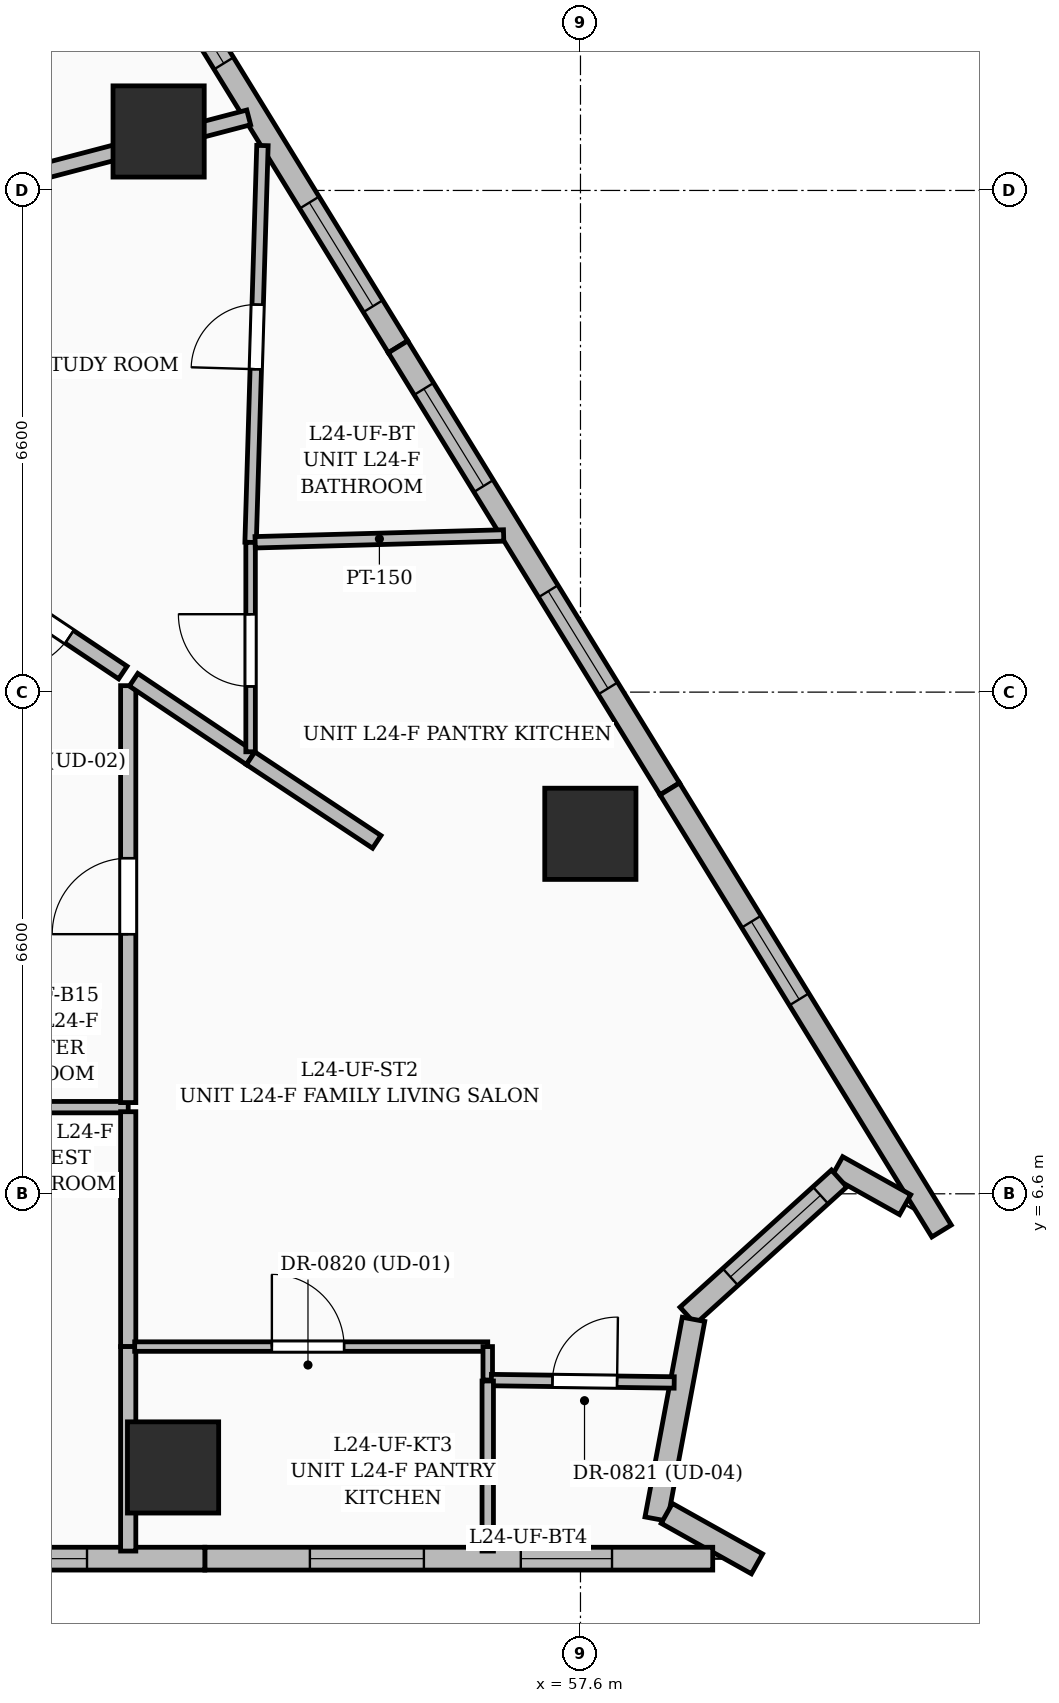
"""IFC4 building model, lengths in metres.
Left out: names, types, materials, properties, quantities, classifications, styles, units other than length and angle.
Written with IfcOpenShell. Run it as: python <this file> out.ifc"""

import sys

from ifc_helpers import new_model, si_unit, direction, frame, frame_2d, origin, origin_2d, place, context, subcontext, project, spatial, rectangle, extrude, element, fill, save


model = new_model("IFC4")
c1 = context("Model", 3, precision=1e-05, world=origin(), true_north=direction((0.0, 1.0)))
c2 = subcontext(c1, "Body", "Model", "MODEL_VIEW")
j1 = project(units=[si_unit("LENGTHUNIT", "METRE"), si_unit("PLANEANGLEUNIT", "RADIAN")], contexts=[c1])
p1 = place(None, origin())
s1 = spatial("IfcSite", under=j1, at=p1, CompositionType="ELEMENT")
p2 = place(p1, origin())
s2 = spatial("IfcBuilding", under=s1, at=p2, CompositionType="ELEMENT")
p3 = place(p2, frame((0.0, 0.0, 96.6)))
s3 = spatial("IfcBuildingStorey", under=s2, at=p3, CompositionType="ELEMENT", Elevation=96.6)
for number, where, z_axis, x_axis in (
    (1, (52.24, 3.0, 0.0), (0.0, 0.0, 1.0), (1.0, 0.0, 0.0)),
    (2, (57.73, 11.336, 0.0), (0.0, 0.0, 1.0), (1.0, 0.0, 0.0)),
    (3, (52.05, 20.576, 0.0), (0.0, 0.0, 1.0), (1.0, 0.0, 0.0)),
):
    element("IfcColumn", number, at=place(p3, frame(where, z_axis=z_axis, x_axis=x_axis)), inside=s3, PredefinedType="COLUMN", context=c2, shape_type="SweptSolid", body=[
        extrude(rectangle(XDim=1.2, YDim=1.2, at=origin_2d()), origin(), (0.0, 0.0, 1.0), 3.6),
    ])
p4 = place(p3, frame((51.624, 23.559, 0.0), z_axis=(0.0, 0.0, 1.0), x_axis=(0.52370032897, -0.851902556303, 0.0)))
e4 = element("IfcWall", 4, at=p4, inside=s3, PredefinedType="SOLIDWALL", context=c2, shape_type="SweptSolid", body=[
    extrude(rectangle(XDim=6.827, YDim=0.3, at=frame_2d((3.414, 0.0))), origin(), (0.0, 0.0, 1.0), 3.3),
])
p5 = place(p4, frame((4.6, 0.0, 0.55)))
e5 = element("IfcOpeningElement", 5, at=p5, cuts=e4, PredefinedType="OPENING", context=c2, shape_type="SweptSolid", body=[
    extrude(rectangle(XDim=1.6, YDim=2.2, at=frame_2d((0.8, 1.1))), frame((0.0, 0.16, 0.0), z_axis=(0.0, -1.0, 0.0), x_axis=(1.0, 0.0, 0.0)), (0.0, 0.0, 1.0), 0.32),
])
p6 = place(p4, frame((0.85, 0.0, 0.55)))
e6 = element("IfcOpeningElement", 6, at=p6, cuts=e4, PredefinedType="OPENING", context=c2, shape_type="SweptSolid", body=[
    extrude(rectangle(XDim=1.6, YDim=2.2, at=frame_2d((0.8, 1.1))), frame((0.0, 0.16, 0.0), z_axis=(0.0, -1.0, 0.0), x_axis=(1.0, 0.0, 0.0)), (0.0, 0.0, 1.0), 0.32),
])
p7 = place(p3, frame((55.199, 17.743, 0.0), z_axis=(0.0, 0.0, 1.0), x_axis=(0.52370032897, -0.851902556303, 0.0)))
e7 = element("IfcWall", 7, at=p7, inside=s3, PredefinedType="SOLIDWALL", context=c2, shape_type="SweptSolid", body=[
    extrude(rectangle(XDim=6.827, YDim=0.3, at=frame_2d((3.414, 0.0))), origin(), (0.0, 0.0, 1.0), 3.3),
])
p8 = place(p7, frame((0.65, 0.0, 0.6)))
e8 = element("IfcOpeningElement", 8, at=p8, cuts=e7, PredefinedType="OPENING", context=c2, shape_type="SweptSolid", body=[
    extrude(rectangle(XDim=1.5, YDim=2.1, at=frame_2d((0.75, 1.05))), frame((0.0, 0.16, 0.0), z_axis=(0.0, -1.0, 0.0), x_axis=(1.0, 0.0, 0.0)), (0.0, 0.0, 1.0), 0.32),
])
p9 = place(p7, frame((3.775, 0.0, 0.6)))
e9 = element("IfcOpeningElement", 9, at=p9, cuts=e7, PredefinedType="OPENING", context=c2, shape_type="SweptSolid", body=[
    extrude(rectangle(XDim=1.5, YDim=2.1, at=frame_2d((0.75, 1.05))), frame((0.0, 0.16, 0.0), z_axis=(0.0, -1.0, 0.0), x_axis=(1.0, 0.0, 0.0)), (0.0, 0.0, 1.0), 0.32),
])
p10 = place(p3, frame((58.775, 11.927, 0.0), z_axis=(0.0, 0.0, 1.0), x_axis=(0.52370032897, -0.851902556303, 0.0)))
e10 = element("IfcWall", 10, at=p10, inside=s3, PredefinedType="SOLIDWALL", context=c2, shape_type="SweptSolid", body=[
    extrude(rectangle(XDim=6.827, YDim=0.3, at=frame_2d((3.414, 0.0))), origin(), (0.0, 0.0, 1.0), 3.3),
])
p11 = place(p10, frame((2.05, 0.0, 0.8)))
e11 = element("IfcOpeningElement", 11, at=p11, cuts=e10, PredefinedType="OPENING", context=c2, shape_type="SweptSolid", body=[
    extrude(rectangle(XDim=1.2, YDim=1.8, at=frame_2d((0.6, 0.9))), frame((0.0, 0.16, 0.0), z_axis=(0.0, -1.0, 0.0), x_axis=(1.0, 0.0, 0.0)), (0.0, 0.0, 1.0), 0.32),
])
p12 = place(p3, frame((61.871, 6.457, 0.0), z_axis=(0.0, 0.0, 1.0), x_axis=(-0.872635981388, 0.488371215355, 0.0)))
e12 = element("IfcWall", 12, at=p12, inside=s3, PredefinedType="SOLIDWALL", context=c2, shape_type="SweptSolid", body=[
    extrude(rectangle(XDim=1.025, YDim=0.3, at=frame_2d((0.512, 0.0))), origin(), (0.0, 0.0, 1.0), 3.3),
])
p13 = place(p3, frame((61.003, 6.802, 0.0), z_axis=(0.0, 0.0, 1.0), x_axis=(-0.741163448221, -0.671324618215, 0.0)))
e13 = element("IfcWall", 13, at=p13, inside=s3, PredefinedType="SOLIDWALL", context=c2, shape_type="SweptSolid", body=[
    extrude(rectangle(XDim=2.688, YDim=0.3, at=frame_2d((1.344, 0.0))), origin(), (0.0, 0.0, 1.0), 3.3),
])
p14 = place(p13, frame((0.33, 0.0, 0.55)))
e14 = element("IfcOpeningElement", 14, at=p14, cuts=e13, PredefinedType="OPENING", context=c2, shape_type="SweptSolid", body=[
    extrude(rectangle(XDim=1.6, YDim=2.2, at=frame_2d((0.8, 1.1))), frame((0.0, 0.16, 0.0), z_axis=(0.0, -1.0, 0.0), x_axis=(1.0, 0.0, 0.0)), (0.0, 0.0, 1.0), 0.32),
])
p15 = place(p3, frame((59.087, 4.948, 0.0), z_axis=(0.0, 0.0, 1.0), x_axis=(-0.183786629236, -0.982966161632, 0.0)))
e15 = element("IfcWall", 15, at=p15, inside=s3, PredefinedType="SOLIDWALL", context=c2, shape_type="SweptSolid", body=[
    extrude(rectangle(XDim=2.673, YDim=0.3, at=frame_2d((1.336, 0.0))), origin(), (0.0, 0.0, 1.0), 3.3),
])
p16 = place(p3, frame((58.735, 2.396, 0.0), z_axis=(0.0, 0.0, 1.0), x_axis=(0.872747775204, -0.488171405221, 0.0)))
e16 = element("IfcWall", 16, at=p16, inside=s3, PredefinedType="SOLIDWALL", context=c2, shape_type="SweptSolid", body=[
    extrude(rectangle(XDim=1.36, YDim=0.3, at=frame_2d((0.68, 0.0))), origin(), (0.0, 0.0, 1.0), 3.3),
])
p17 = place(p3, frame((59.34, 1.8, 0.0), z_axis=(0.0, 0.0, 1.0), x_axis=(-1.0, 0.0, 0.0)))
e17 = element("IfcWall", 17, at=p17, inside=s3, PredefinedType="SOLIDWALL", context=c2, shape_type="SweptSolid", body=[
    extrude(rectangle(XDim=6.682, YDim=0.3, at=frame_2d((3.341, 0.0))), origin(), (0.0, 0.0, 1.0), 3.3),
])
p18 = place(p17, frame((3.8, 0.0, 0.6)))
e18 = element("IfcOpeningElement", 18, at=p18, cuts=e17, PredefinedType="OPENING", context=c2, shape_type="SweptSolid", body=[
    extrude(rectangle(XDim=1.5, YDim=2.1, at=frame_2d((0.75, 1.05))), frame((0.0, 0.16, 0.0), z_axis=(0.0, -1.0, 0.0), x_axis=(1.0, 0.0, 0.0)), (0.0, 0.0, 1.0), 0.32),
])
p19 = place(p17, frame((1.325, 0.0, 0.8)))
e19 = element("IfcOpeningElement", 19, at=p19, cuts=e17, PredefinedType="OPENING", context=c2, shape_type="SweptSolid", body=[
    extrude(rectangle(XDim=1.2, YDim=1.8, at=frame_2d((0.6, 0.9))), frame((0.0, 0.16, 0.0), z_axis=(0.0, -1.0, 0.0), x_axis=(1.0, 0.0, 0.0)), (0.0, 0.0, 1.0), 0.32),
])
p20 = place(p3, frame((52.658, 1.8, 0.0), z_axis=(0.0, 0.0, 1.0), x_axis=(-1.0, 0.0, 0.0)))
e20 = element("IfcWall", 20, at=p20, inside=s3, PredefinedType="SOLIDWALL", context=c2, shape_type="SweptSolid", body=[
    extrude(rectangle(XDim=7.282, YDim=0.3, at=frame_2d((3.641, 0.0))), origin(), (0.0, 0.0, 1.0), 3.3),
])
p21 = place(p20, frame((1.55, 0.0, 0.8)))
e21 = element("IfcOpeningElement", 21, at=p21, cuts=e20, PredefinedType="OPENING", context=c2, shape_type="SweptSolid", body=[
    extrude(rectangle(XDim=1.2, YDim=1.8, at=frame_2d((0.6, 0.9))), frame((0.0, 0.16, 0.0), z_axis=(0.0, -1.0, 0.0), x_axis=(1.0, 0.0, 0.0)), (0.0, 0.0, 1.0), 0.32),
])
p22 = place(p20, frame((4.425, 0.0, 0.8)))
e22 = element("IfcOpeningElement", 22, at=p22, cuts=e20, PredefinedType="OPENING", context=c2, shape_type="SweptSolid", body=[
    extrude(rectangle(XDim=1.2, YDim=1.8, at=frame_2d((0.6, 0.9))), frame((0.0, 0.16, 0.0), z_axis=(0.0, -1.0, 0.0), x_axis=(1.0, 0.0, 0.0)), (0.0, 0.0, 1.0), 0.32),
])
p23 = place(p3, frame((51.65, 7.74, 0.0), z_axis=(0.0, 0.0, 1.0), x_axis=(-1.0, 0.0, 0.0)))
e23 = element("IfcWall", 23, at=p23, inside=s3, PredefinedType="PARTITIONING", context=c2, shape_type="SweptSolid", body=[
    extrude(rectangle(XDim=2.355, YDim=0.15, at=frame_2d((1.177, 0.0))), origin(), (0.0, 0.0, 1.0), 3.3),
])
p24 = place(p3, frame((51.65, 4.59, 0.0), z_axis=(0.0, 0.0, 1.0), x_axis=(0.0, 1.0, 0.0)))
e24 = element("IfcWall", 24, at=p24, inside=s3, PredefinedType="PARTITIONING", context=c2, shape_type="SweptSolid", body=[
    extrude(rectangle(XDim=3.09, YDim=0.2, at=frame_2d((1.545, 0.0))), origin(), (0.0, 0.0, 1.0), 2.81),
])
p25 = place(p3, frame((51.65, 1.9, 0.0), z_axis=(0.0, 0.0, 1.0), x_axis=(0.0, 1.0, 0.0)))
e25 = element("IfcWall", 25, at=p25, inside=s3, PredefinedType="PARTITIONING", context=c2, shape_type="SweptSolid", body=[
    extrude(rectangle(XDim=2.69, YDim=0.2, at=frame_2d((1.345, 0.0))), origin(), (0.0, 0.0, 1.0), 2.295),
])
p26 = place(p3, frame((51.65, 7.8, 0.0), z_axis=(0.0, 0.0, 1.0), x_axis=(0.0, 1.0, 0.0)))
e26 = element("IfcWall", 26, at=p26, inside=s3, PredefinedType="PARTITIONING", context=c2, shape_type="SweptSolid", body=[
    extrude(rectangle(XDim=5.485, YDim=0.2, at=frame_2d((2.742, 0.0))), origin(), (0.0, 0.0, 1.0), 2.295),
])
p27 = place(p26, frame((2.216, 0.0, 0.0)))
e27 = element("IfcOpeningElement", 27, at=p27, cuts=e26, PredefinedType="OPENING", context=c2, shape_type="SweptSolid", body=[
    extrude(rectangle(XDim=1.0, YDim=2.2, at=frame_2d((0.5, 1.1))), frame((0.0, 0.11, 0.0), z_axis=(0.0, -1.0, 0.0), x_axis=(1.0, 0.0, 0.0)), (0.0, 0.0, 1.0), 0.22),
])
p28 = place(p3, frame((51.579, 13.457, 0.0), z_axis=(0.0, 0.0, 1.0), x_axis=(-0.831522214089, 0.555491500814, 0.0)))
e28 = element("IfcWall", 28, at=p28, inside=s3, PredefinedType="PARTITIONING", context=c2, shape_type="SweptSolid", body=[
    extrude(rectangle(XDim=2.705, YDim=0.2, at=frame_2d((1.352, 0.0))), origin(), (0.0, 0.0, 1.0), 2.81),
])
p29 = place(p28, frame((0.846, 0.0, 0.0)))
e29 = element("IfcOpeningElement", 29, at=p29, cuts=e28, PredefinedType="OPENING", context=c2, shape_type="SweptSolid", body=[
    extrude(rectangle(XDim=1.0, YDim=2.2, at=frame_2d((0.5, 1.1))), frame((0.0, 0.11, 0.0), z_axis=(0.0, -1.0, 0.0), x_axis=(1.0, 0.0, 0.0)), (0.0, 0.0, 1.0), 0.22),
])
p30 = place(p3, frame((51.735, 4.59, 0.0), z_axis=(0.0, 0.0, 1.0), x_axis=(1.0, 0.0, 0.0)))
e30 = element("IfcWall", 30, at=p30, inside=s3, PredefinedType="PARTITIONING", context=c2, shape_type="SweptSolid", body=[
    extrude(rectangle(XDim=4.645, YDim=0.125, at=frame_2d((2.322, 0.0))), origin(), (0.0, 0.0, 1.0), 2.32),
])
p31 = place(p30, frame((1.805, 0.0, 0.0)))
e31 = element("IfcOpeningElement", 31, at=p31, cuts=e30, PredefinedType="OPENING", context=c2, shape_type="SweptSolid", body=[
    extrude(rectangle(XDim=0.95, YDim=2.2, at=frame_2d((0.475, 1.1))), frame((0.0, 0.072, 0.0), z_axis=(0.0, -1.0, 0.0), x_axis=(1.0, 0.0, 0.0)), (0.0, 0.0, 1.0), 0.145),
])
p32 = place(p3, frame((56.38, 4.59, 0.0), z_axis=(0.0, 0.0, 1.0), x_axis=(0.0, -1.0, 0.0)))
e32 = element("IfcWall", 32, at=p32, inside=s3, PredefinedType="PARTITIONING", context=c2, shape_type="SweptSolid", body=[
    extrude(rectangle(XDim=0.44, YDim=0.125, at=frame_2d((0.22, 0.0))), origin(), (0.0, 0.0, 1.0), 3.3),
])
p33 = place(p3, frame((56.427, 4.149, 0.0), z_axis=(0.0, 0.0, 1.0), x_axis=(0.999914304773, -0.013091337188, 0.0)))
e33 = element("IfcWall", 33, at=p33, inside=s3, PredefinedType="PARTITIONING", context=c2, shape_type="SweptSolid", body=[
    extrude(rectangle(XDim=2.406, YDim=0.15, at=frame_2d((1.203, 0.0))), origin(), (0.0, 0.0, 1.0), 3.3),
])
p34 = place(p33, frame((0.804, 0.0, 0.0)))
e34 = element("IfcOpeningElement", 34, at=p34, cuts=e33, PredefinedType="OPENING", context=c2, shape_type="SweptSolid", body=[
    extrude(rectangle(XDim=0.85, YDim=2.1, at=frame_2d((0.425, 1.05))), frame((0.0, 0.085, 0.0), z_axis=(0.0, -1.0, 0.0), x_axis=(1.0, 0.0, 0.0)), (0.0, 0.0, 1.0), 0.17),
])
p35 = place(p3, frame((53.26, 12.33, 0.0), z_axis=(0.0, 0.0, 1.0), x_axis=(-0.830486641952, 0.557038542239, 0.0)))
e35 = element("IfcWall", 35, at=p35, inside=s3, PredefinedType="PARTITIONING", context=c2, shape_type="SweptSolid", body=[
    extrude(rectangle(XDim=1.854, YDim=0.2, at=frame_2d((0.927, 0.0))), origin(), (0.0, 0.0, 1.0), 2.81),
])
p36 = place(p3, frame((54.92, 11.23, 0.0), z_axis=(0.0, 0.0, 1.0), x_axis=(-0.833556136646, 0.552434762719, 0.0)))
e36 = element("IfcWall", 36, at=p36, inside=s3, PredefinedType="PARTITIONING", context=c2, shape_type="SweptSolid", body=[
    extrude(rectangle(XDim=1.991, YDim=0.2, at=frame_2d((0.996, 0.0))), origin(), (0.0, 0.0, 1.0), 2.295),
])
p37 = place(p3, frame((56.38, 1.9, 0.0), z_axis=(0.0, 0.0, 1.0), x_axis=(0.0, 1.0, 0.0)))
e37 = element("IfcWall", 37, at=p37, inside=s3, PredefinedType="PARTITIONING", context=c2, shape_type="SweptSolid", body=[
    extrude(rectangle(XDim=2.238, YDim=0.15, at=frame_2d((1.119, 0.0))), origin(), (0.0, 0.0, 1.0), 3.3),
])
p38 = place(p3, frame((53.26, 15.17, 0.0), z_axis=(0.0, 0.0, 1.0), x_axis=(0.029866031463, 0.999553910584, 0.0)))
e38 = element("IfcWall", 38, at=p38, inside=s3, PredefinedType="PARTITIONING", context=c2, shape_type="SweptSolid", body=[
    extrude(rectangle(XDim=5.224, YDim=0.15, at=frame_2d((2.612, 0.0))), origin(), (0.0, 0.0, 1.0), 2.32),
])
p39 = place(p38, frame((2.279, 0.0, 0.0)))
e39 = element("IfcOpeningElement", 39, at=p39, cuts=e38, PredefinedType="OPENING", context=c2, shape_type="SweptSolid", body=[
    extrude(rectangle(XDim=0.85, YDim=2.1, at=frame_2d((0.425, 1.05))), frame((0.0, 0.085, 0.0), z_axis=(0.0, -1.0, 0.0), x_axis=(1.0, 0.0, 0.0)), (0.0, 0.0, 1.0), 0.17),
])
p40 = place(p3, frame((53.26, 12.415, 0.0), z_axis=(0.0, 0.0, 1.0), x_axis=(0.0, 1.0, 0.0)))
e40 = element("IfcWall", 40, at=p40, inside=s3, PredefinedType="PARTITIONING", context=c2, shape_type="SweptSolid", body=[
    extrude(rectangle(XDim=2.755, YDim=0.125, at=frame_2d((1.377, 0.0))), origin(), (0.0, 0.0, 1.0), 3.3),
])
p41 = place(p40, frame((0.86, 0.0, 0.0)))
e41 = element("IfcOpeningElement", 41, at=p41, cuts=e40, PredefinedType="OPENING", context=c2, shape_type="SweptSolid", body=[
    extrude(rectangle(XDim=0.95, YDim=2.2, at=frame_2d((0.475, 1.1))), frame((0.0, 0.072, 0.0), z_axis=(0.0, -1.0, 0.0), x_axis=(1.0, 0.0, 0.0)), (0.0, 0.0, 1.0), 0.145),
])
p42 = place(p3, frame((53.235, 20.761, 0.0), z_axis=(0.0, 0.0, 1.0), x_axis=(-0.967298670581, -0.253640063657, 0.0)))
e42 = element("IfcWall", 42, at=p42, inside=s3, PredefinedType="PARTITIONING", context=c2, shape_type="SweptSolid", body=[
    extrude(rectangle(XDim=11.241, YDim=0.2, at=frame_2d((5.62, 0.0))), origin(), (0.0, 0.0, 1.0), 2.259),
])
p43 = place(p3, frame((53.32, 15.171, 0.0), z_axis=(0.0, 0.0, 1.0), x_axis=(0.999624598181, 0.02739822461, 0.0)))
e43 = element("IfcWall", 43, at=p43, inside=s3, PredefinedType="PARTITIONING", context=c2, shape_type="SweptSolid", body=[
    extrude(rectangle(XDim=3.27, YDim=0.15, at=frame_2d((1.635, 0.0))), origin(), (0.0, 0.0, 1.0), 2.32),
])
p44 = place(p5, origin())
e44 = element("IfcWindow", 44, at=p44, inside=s3, PartitioningType="SINGLE_PANEL", PredefinedType="WINDOW", context=c2, shape_type="SweptSolid", body=[
    extrude(rectangle(XDim=1.6, YDim=2.2, at=frame_2d((0.8, 1.1))), frame((0.0, 0.03, 0.0), z_axis=(0.0, -1.0, 0.0), x_axis=(1.0, 0.0, 0.0)), (0.0, 0.0, 1.0), 0.06),
])
fill(e5, e44)
p45 = place(p6, origin())
e45 = element("IfcWindow", 45, at=p45, inside=s3, PartitioningType="SINGLE_PANEL", PredefinedType="WINDOW", context=c2, shape_type="SweptSolid", body=[
    extrude(rectangle(XDim=1.6, YDim=2.2, at=frame_2d((0.8, 1.1))), frame((0.0, 0.03, 0.0), z_axis=(0.0, -1.0, 0.0), x_axis=(1.0, 0.0, 0.0)), (0.0, 0.0, 1.0), 0.06),
])
fill(e6, e45)
p46 = place(p8, origin())
e46 = element("IfcWindow", 46, at=p46, inside=s3, PartitioningType="SINGLE_PANEL", PredefinedType="WINDOW", context=c2, shape_type="SweptSolid", body=[
    extrude(rectangle(XDim=1.5, YDim=2.1, at=frame_2d((0.75, 1.05))), frame((0.0, 0.03, 0.0), z_axis=(0.0, -1.0, 0.0), x_axis=(1.0, 0.0, 0.0)), (0.0, 0.0, 1.0), 0.06),
])
fill(e8, e46)
p47 = place(p9, origin())
e47 = element("IfcWindow", 47, at=p47, inside=s3, PartitioningType="SINGLE_PANEL", PredefinedType="WINDOW", context=c2, shape_type="SweptSolid", body=[
    extrude(rectangle(XDim=1.5, YDim=2.1, at=frame_2d((0.75, 1.05))), frame((0.0, 0.03, 0.0), z_axis=(0.0, -1.0, 0.0), x_axis=(1.0, 0.0, 0.0)), (0.0, 0.0, 1.0), 0.06),
])
fill(e9, e47)
p48 = place(p11, origin())
e48 = element("IfcWindow", 48, at=p48, inside=s3, PartitioningType="SINGLE_PANEL", PredefinedType="WINDOW", context=c2, shape_type="SweptSolid", body=[
    extrude(rectangle(XDim=1.2, YDim=1.8, at=frame_2d((0.6, 0.9))), frame((0.0, 0.03, 0.0), z_axis=(0.0, -1.0, 0.0), x_axis=(1.0, 0.0, 0.0)), (0.0, 0.0, 1.0), 0.06),
])
fill(e11, e48)
p49 = place(p14, origin())
e49 = element("IfcWindow", 49, at=p49, inside=s3, PartitioningType="SINGLE_PANEL", PredefinedType="WINDOW", context=c2, shape_type="SweptSolid", body=[
    extrude(rectangle(XDim=1.6, YDim=2.2, at=frame_2d((0.8, 1.1))), frame((0.0, 0.03, 0.0), z_axis=(0.0, -1.0, 0.0), x_axis=(1.0, 0.0, 0.0)), (0.0, 0.0, 1.0), 0.06),
])
fill(e14, e49)
p50 = place(p18, origin())
e50 = element("IfcWindow", 50, at=p50, inside=s3, PartitioningType="SINGLE_PANEL", PredefinedType="WINDOW", context=c2, shape_type="SweptSolid", body=[
    extrude(rectangle(XDim=1.5, YDim=2.1, at=frame_2d((0.75, 1.05))), frame((0.0, 0.03, 0.0), z_axis=(0.0, -1.0, 0.0), x_axis=(1.0, 0.0, 0.0)), (0.0, 0.0, 1.0), 0.06),
])
fill(e18, e50)
p51 = place(p19, origin())
e51 = element("IfcWindow", 51, at=p51, inside=s3, PartitioningType="SINGLE_PANEL", PredefinedType="WINDOW", context=c2, shape_type="SweptSolid", body=[
    extrude(rectangle(XDim=1.2, YDim=1.8, at=frame_2d((0.6, 0.9))), frame((0.0, 0.03, 0.0), z_axis=(0.0, -1.0, 0.0), x_axis=(1.0, 0.0, 0.0)), (0.0, 0.0, 1.0), 0.06),
])
fill(e19, e51)
p52 = place(p21, origin())
e52 = element("IfcWindow", 52, at=p52, inside=s3, PartitioningType="SINGLE_PANEL", PredefinedType="WINDOW", context=c2, shape_type="SweptSolid", body=[
    extrude(rectangle(XDim=1.2, YDim=1.8, at=frame_2d((0.6, 0.9))), frame((0.0, 0.03, 0.0), z_axis=(0.0, -1.0, 0.0), x_axis=(1.0, 0.0, 0.0)), (0.0, 0.0, 1.0), 0.06),
])
fill(e21, e52)
p53 = place(p31, origin())
e53 = element("IfcDoor", 53, at=p53, inside=s3, OperationType="SINGLE_SWING_LEFT", PredefinedType="DOOR", context=c2, shape_type="SweptSolid", body=[
    extrude(rectangle(XDim=0.95, YDim=2.2, at=frame_2d((0.475, 1.1))), frame((0.0, 0.025, 0.0), z_axis=(0.0, -1.0, 0.0), x_axis=(1.0, 0.0, 0.0)), (0.0, 0.0, 1.0), 0.05),
])
fill(e31, e53)
p54 = place(p34, origin())
e54 = element("IfcDoor", 54, at=p54, inside=s3, OperationType="SINGLE_SWING_RIGHT", PredefinedType="DOOR", context=c2, shape_type="SweptSolid", body=[
    extrude(rectangle(XDim=0.85, YDim=2.1, at=frame_2d((0.425, 1.05))), frame((0.0, 0.025, 0.0), z_axis=(0.0, -1.0, 0.0), x_axis=(1.0, 0.0, 0.0)), (0.0, 0.0, 1.0), 0.05),
])
fill(e34, e54)
p55 = place(p41, origin())
e55 = element("IfcDoor", 55, at=p55, inside=s3, OperationType="SINGLE_SWING_RIGHT", PredefinedType="DOOR", context=c2, shape_type="SweptSolid", body=[
    extrude(rectangle(XDim=0.95, YDim=2.2, at=frame_2d((0.475, 1.1))), frame((0.0, 0.025, 0.0), z_axis=(0.0, -1.0, 0.0), x_axis=(1.0, 0.0, 0.0)), (0.0, 0.0, 1.0), 0.05),
])
fill(e41, e55)
p56 = place(p39, origin())
e56 = element("IfcDoor", 56, at=p56, inside=s3, OperationType="SINGLE_SWING_LEFT", PredefinedType="DOOR", context=c2, shape_type="SweptSolid", body=[
    extrude(rectangle(XDim=0.85, YDim=2.1, at=frame_2d((0.425, 1.05))), frame((0.0, 0.025, 0.0), z_axis=(0.0, -1.0, 0.0), x_axis=(1.0, 0.0, 0.0)), (0.0, 0.0, 1.0), 0.05),
])
fill(e39, e56)
p57 = place(p29, origin())
e57 = element("IfcDoor", 57, at=p57, inside=s3, OperationType="SINGLE_SWING_RIGHT", PredefinedType="DOOR", context=c2, shape_type="SweptSolid", body=[
    extrude(rectangle(XDim=1.0, YDim=2.2, at=frame_2d((0.5, 1.1))), frame((0.0, 0.025, 0.0), z_axis=(0.0, -1.0, 0.0), x_axis=(1.0, 0.0, 0.0)), (0.0, 0.0, 1.0), 0.05),
])
fill(e29, e57)
p58 = place(p27, origin())
e58 = element("IfcDoor", 58, at=p58, inside=s3, OperationType="SINGLE_SWING_LEFT", PredefinedType="DOOR", context=c2, shape_type="SweptSolid", body=[
    extrude(rectangle(XDim=1.0, YDim=2.2, at=frame_2d((0.5, 1.1))), frame((0.0, 0.025, 0.0), z_axis=(0.0, -1.0, 0.0), x_axis=(1.0, 0.0, 0.0)), (0.0, 0.0, 1.0), 0.05),
])
fill(e27, e58)
save(model, sys.argv[1])
